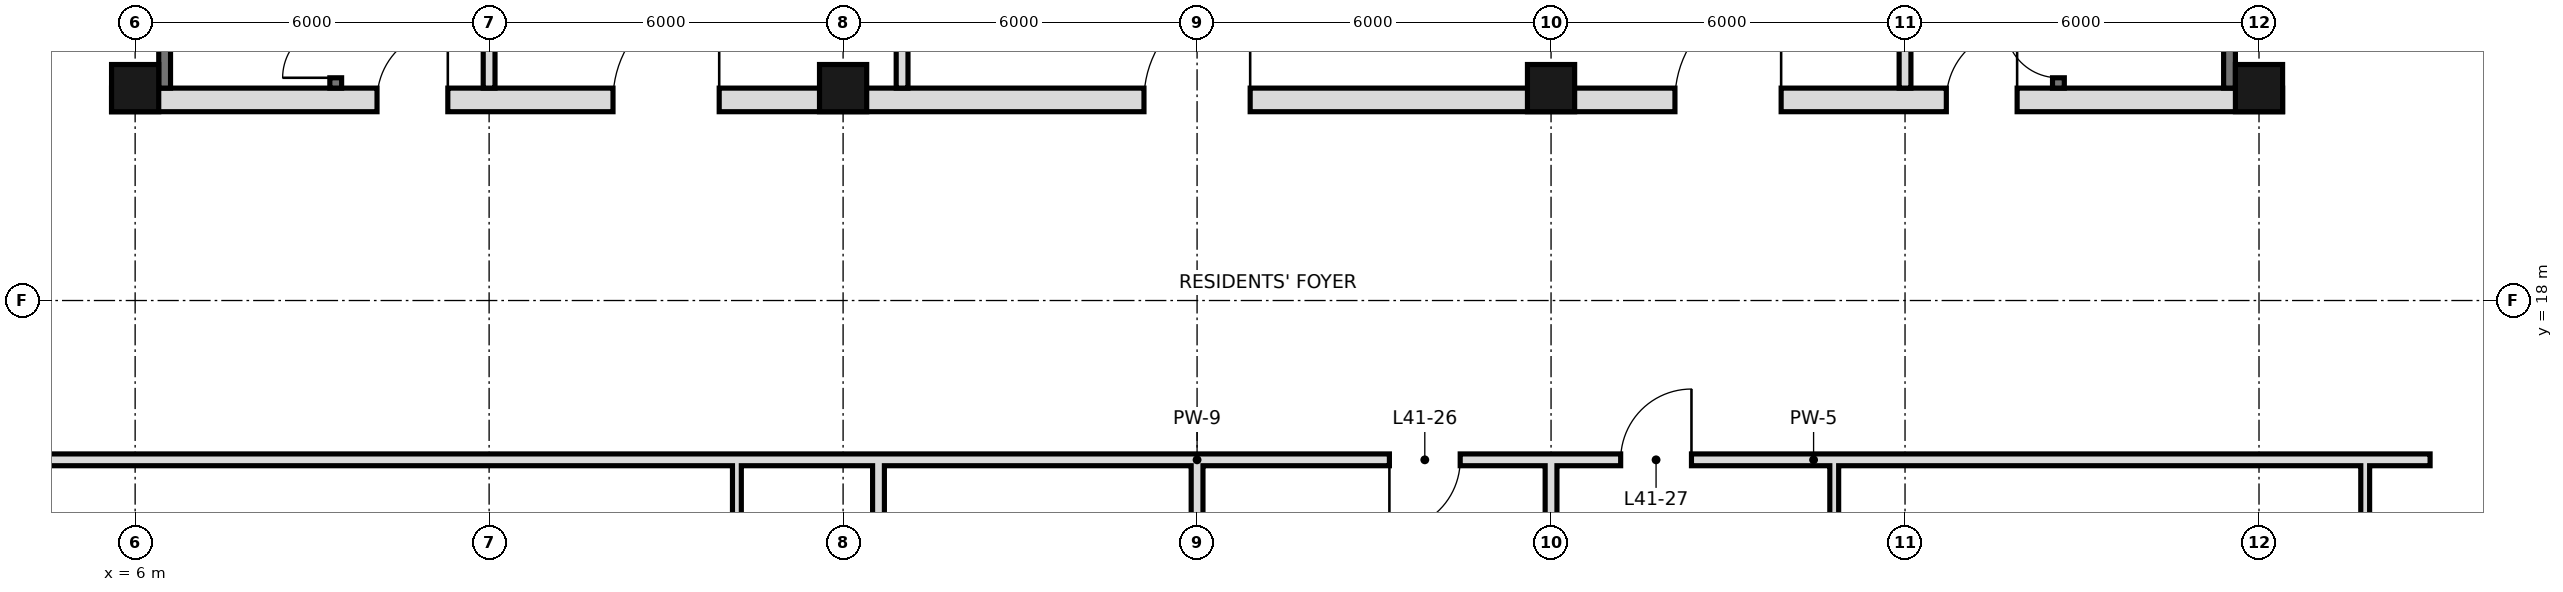
"""IFC4 building model, lengths in metres.
Left out: names, types, materials, properties, quantities, classifications, styles, units other than length and angle.
Written with IfcOpenShell. Run it as: python <this file> out.ifc"""

import sys

from ifc_helpers import new_model, si_unit, direction, frame, frame_2d, origin, origin_2d, place, context, subcontext, project, spatial, rectangle, hollow_rectangle, extrude, element, fill, save


model = new_model("IFC4")
c1 = context("Model", 3, precision=1e-05, world=origin(), true_north=direction((0.0, 1.0)))
c2 = subcontext(c1, "Body", "Model", "MODEL_VIEW")
j1 = project(units=[si_unit("LENGTHUNIT", "METRE"), si_unit("PLANEANGLEUNIT", "RADIAN")], contexts=[c1])
p1 = place(None, origin())
s1 = spatial("IfcSite", under=j1, at=p1, CompositionType="ELEMENT")
p2 = place(p1, origin())
s2 = spatial("IfcBuilding", under=s1, at=p2, CompositionType="ELEMENT")
p3 = place(p2, frame((0.0, 0.0, 178.0)))
s3 = spatial("IfcBuildingStorey", under=s2, at=p3, CompositionType="ELEMENT", Elevation=178.0)
for number, where, z_axis, x_axis in (
    (1, (6.0, 21.6, 0.0), (0.0, 0.0, 1.0), (1.0, 0.0, 0.0)),
    (2, (18.0, 21.6, 0.0), (0.0, 0.0, 1.0), (1.0, 0.0, 0.0)),
    (3, (30.0, 21.6, 0.0), (0.0, 0.0, 1.0), (1.0, 0.0, 0.0)),
    (4, (42.0, 21.6, 0.0), (0.0, 0.0, 1.0), (1.0, 0.0, 0.0)),
):
    element("IfcColumn", number, at=place(p3, frame(where, z_axis=z_axis, x_axis=x_axis)), inside=s3, PredefinedType="COLUMN", context=c2, shape_type="SweptSolid", body=[
        extrude(hollow_rectangle(XDim=0.8, YDim=0.8, WallThickness=0.045, at=origin_2d()), origin(), (0.0, 0.0, 1.0), 3.6),
    ])
p4 = place(p3, frame((16.2, 10.8, 0.0), z_axis=(0.0, 0.0, 1.0), x_axis=(0.0, 1.0, 0.0)))
e5 = element("IfcWall", 5, at=p4, inside=s3, PredefinedType="PARTITIONING", context=c2, shape_type="SweptSolid", body=[
    extrude(rectangle(XDim=4.5, YDim=0.15, at=frame_2d((2.25, 0.0))), origin(), (0.0, 0.0, 1.0), 3.42),
])
for number, where, z_axis, x_axis in (
    (6, (18.6, 10.8, 0.0), (0.0, 0.0, 1.0), (0.0, 1.0, 0.0)),
    (7, (24.0, 10.8, 0.0), (0.0, 0.0, 1.0), (0.0, 1.0, 0.0)),
):
    element("IfcWall", number, at=place(p3, frame(where, z_axis=z_axis, x_axis=x_axis)), inside=s3, PredefinedType="SOLIDWALL", context=c2, shape_type="SweptSolid", body=[
        extrude(rectangle(XDim=4.5, YDim=0.2, at=frame_2d((2.25, 0.0))), origin(), (0.0, 0.0, 1.0), 2.72),
    ])
p5 = place(p3, frame((30.0, -0.6, 0.0), z_axis=(0.0, 0.0, 1.0), x_axis=(0.0, 1.0, 0.0)))
e8 = element("IfcWall", 8, at=p5, inside=s3, PredefinedType="SOLIDWALL", context=c2, shape_type="SweptSolid", body=[
    extrude(rectangle(XDim=15.9, YDim=0.2, at=frame_2d((7.95, 0.0))), origin(), (0.0, 0.0, 1.0), 2.72),
])
for number, where, z_axis, x_axis in (
    (9, (34.8, 10.8, 0.0), (0.0, 0.0, 1.0), (0.0, 1.0, 0.0)),
    (10, (43.8, 10.8, 0.0), (0.0, 0.0, 1.0), (0.0, 1.0, 0.0)),
):
    element("IfcWall", number, at=place(p3, frame(where, z_axis=z_axis, x_axis=x_axis)), inside=s3, PredefinedType="PARTITIONING", context=c2, shape_type="SweptSolid", body=[
        extrude(rectangle(XDim=4.5, YDim=0.15, at=frame_2d((2.25, 0.0))), origin(), (0.0, 0.0, 1.0), 3.42),
    ])
p6 = place(p3, frame((3.1, 15.3, 0.0), z_axis=(0.0, 0.0, 1.0), x_axis=(1.0, 0.0, 0.0)))
e11 = element("IfcWall", 11, at=p6, inside=s3, PredefinedType="SOLIDWALL", context=c2, shape_type="SweptSolid", body=[
    extrude(rectangle(XDim=15.5, YDim=0.2, at=frame_2d((7.75, 0.0))), origin(), (0.0, 0.0, 1.0), 2.72),
])
p7 = place(p3, frame((24.0, 15.3, 0.0), z_axis=(0.0, 0.0, 1.0), x_axis=(1.0, 0.0, 0.0)))
e12 = element("IfcWall", 12, at=p7, inside=s3, PredefinedType="SOLIDWALL", context=c2, shape_type="SweptSolid", body=[
    extrude(rectangle(XDim=20.9, YDim=0.2, at=frame_2d((10.45, 0.0))), origin(), (0.0, 0.0, 1.0), 2.72),
])
p8 = place(p7, frame((3.26, 0.0, 0.0)))
e13 = element("IfcOpeningElement", 13, at=p8, cuts=e12, PredefinedType="OPENING", context=c2, shape_type="SweptSolid", body=[
    extrude(rectangle(XDim=1.2, YDim=2.4, at=frame_2d((0.6, 1.2))), frame((0.0, 0.11, 0.0), z_axis=(0.0, -1.0, 0.0), x_axis=(1.0, 0.0, 0.0)), (0.0, 0.0, 1.0), 0.22),
])
p9 = place(p7, frame((7.18, 0.0, 0.0)))
e14 = element("IfcOpeningElement", 14, at=p9, cuts=e12, PredefinedType="OPENING", context=c2, shape_type="SweptSolid", body=[
    extrude(rectangle(XDim=1.2, YDim=2.4, at=frame_2d((0.6, 1.2))), frame((0.0, 0.11, 0.0), z_axis=(0.0, -1.0, 0.0), x_axis=(1.0, 0.0, 0.0)), (0.0, 0.0, 1.0), 0.22),
])
p10 = place(p3, frame((18.6, 15.3, 0.0), z_axis=(0.0, 0.0, 1.0), x_axis=(1.0, 0.0, 0.0)))
e15 = element("IfcWall", 15, at=p10, inside=s3, PredefinedType="SOLIDWALL", context=c2, shape_type="SweptSolid", body=[
    extrude(rectangle(XDim=5.4, YDim=0.2, at=frame_2d((2.7, 0.0))), origin(), (0.0, 0.0, 1.0), 3.42),
])
for number, where, z_axis, x_axis in (
    (16, (6.5, 21.6, 0.0), (0.0, 0.0, 1.0), (0.0, 1.0, 0.0)),
    (17, (41.5, 21.6, 0.0), (0.0, 0.0, 1.0), (0.0, 1.0, 0.0)),
):
    element("IfcWall", number, at=place(p3, frame(where, z_axis=z_axis, x_axis=x_axis)), inside=s3, PredefinedType="SOLIDWALL", context=c2, shape_type="SweptSolid", body=[
        extrude(rectangle(XDim=23.5, YDim=0.2, at=frame_2d((11.75, 0.0))), origin(), (0.0, 0.0, 1.0), 3.42),
    ])
p11 = place(p3, frame((5.6, 21.4, 0.0), z_axis=(0.0, 0.0, 1.0), x_axis=(1.0, 0.0, 0.0)))
e18 = element("IfcWall", 18, at=p11, inside=s3, PredefinedType="SOLIDWALL", context=c2, shape_type="SweptSolid", body=[
    extrude(rectangle(XDim=36.8, YDim=0.4, at=frame_2d((18.4, 0.0))), origin(), (0.0, 0.0, 1.0), 3.42),
])
p12 = place(p11, frame((8.5, 0.0, 0.0)))
e19 = element("IfcOpeningElement", 19, at=p12, cuts=e18, PredefinedType="OPENING", context=c2, shape_type="SweptSolid", body=[
    extrude(rectangle(XDim=1.8, YDim=2.1, at=frame_2d((0.9, 1.05))), frame((0.0, 0.21, 0.0), z_axis=(0.0, -1.0, 0.0), x_axis=(1.0, 0.0, 0.0)), (0.0, 0.0, 1.0), 0.42),
])
p13 = place(p11, frame((17.5, 0.0, 0.0)))
e20 = element("IfcOpeningElement", 20, at=p13, cuts=e18, PredefinedType="OPENING", context=c2, shape_type="SweptSolid", body=[
    extrude(rectangle(XDim=1.8, YDim=2.1, at=frame_2d((0.9, 1.05))), frame((0.0, 0.21, 0.0), z_axis=(0.0, -1.0, 0.0), x_axis=(1.0, 0.0, 0.0)), (0.0, 0.0, 1.0), 0.42),
])
p14 = place(p11, frame((26.5, 0.0, 0.0)))
e21 = element("IfcOpeningElement", 21, at=p14, cuts=e18, PredefinedType="OPENING", context=c2, shape_type="SweptSolid", body=[
    extrude(rectangle(XDim=1.8, YDim=2.1, at=frame_2d((0.9, 1.05))), frame((0.0, 0.21, 0.0), z_axis=(0.0, -1.0, 0.0), x_axis=(1.0, 0.0, 0.0)), (0.0, 0.0, 1.0), 0.42),
])
p15 = place(p11, frame((4.5, 0.0, 0.0)))
e22 = element("IfcOpeningElement", 22, at=p15, cuts=e18, PredefinedType="OPENING", context=c2, shape_type="SweptSolid", body=[
    extrude(rectangle(XDim=1.2, YDim=2.1, at=frame_2d((0.6, 1.05))), frame((0.0, 0.21, 0.0), z_axis=(0.0, -1.0, 0.0), x_axis=(1.0, 0.0, 0.0)), (0.0, 0.0, 1.0), 0.42),
])
p16 = place(p11, frame((31.1, 0.0, 0.0)))
e23 = element("IfcOpeningElement", 23, at=p16, cuts=e18, PredefinedType="OPENING", context=c2, shape_type="SweptSolid", body=[
    extrude(rectangle(XDim=1.2, YDim=2.1, at=frame_2d((0.6, 1.05))), frame((0.0, 0.21, 0.0), z_axis=(0.0, -1.0, 0.0), x_axis=(1.0, 0.0, 0.0)), (0.0, 0.0, 1.0), 0.42),
])
p17 = place(p3, frame((19.0, 21.6, 0.0), z_axis=(0.0, 0.0, 1.0), x_axis=(0.0, 1.0, 0.0)))
e24 = element("IfcWall", 24, at=p17, inside=s3, PredefinedType="PARTITIONING", context=c2, shape_type="SweptSolid", body=[
    extrude(rectangle(XDim=6.0, YDim=0.2, at=frame_2d((3.0, 0.0))), origin(), (0.0, 0.0, 1.0), 3.42),
])
p18 = place(p17, frame((2.1, 0.0, 0.0)))
e25 = element("IfcOpeningElement", 25, at=p18, cuts=e24, PredefinedType="OPENING", context=c2, shape_type="SweptSolid", body=[
    extrude(rectangle(XDim=1.8, YDim=2.1, at=frame_2d((0.9, 1.05))), frame((0.0, 0.11, 0.0), z_axis=(0.0, -1.0, 0.0), x_axis=(1.0, 0.0, 0.0)), (0.0, 0.0, 1.0), 0.22),
])
for number, where, z_axis, x_axis in (
    (26, (12.0, 21.6, 0.0), (0.0, 0.0, 1.0), (0.0, 1.0, 0.0)),
    (27, (36.0, 21.6, 0.0), (0.0, 0.0, 1.0), (0.0, 1.0, 0.0)),
):
    element("IfcWall", number, at=place(p3, frame(where, z_axis=z_axis, x_axis=x_axis)), inside=s3, PredefinedType="PARTITIONING", context=c2, shape_type="SweptSolid", body=[
        extrude(rectangle(XDim=6.1, YDim=0.2, at=frame_2d((3.05, 0.0))), origin(), (0.0, 0.0, 1.0), 3.42),
    ])
p19 = place(p3, frame((38.6, 21.6, 0.0), z_axis=(0.0, 0.0, 1.0), x_axis=(0.0, 1.0, 0.0)))
e28 = element("IfcWall", 28, at=p19, inside=s3, PredefinedType="SOLIDWALL", context=c2, shape_type="SweptSolid", body=[
    extrude(rectangle(XDim=23.4, YDim=0.2, at=frame_2d((11.7, 0.0))), origin(), (0.0, 0.0, 1.0), 3.42),
])
p20 = place(p19, frame((7.0, 0.0, 0.0)))
e29 = element("IfcOpeningElement", 29, at=p20, cuts=e28, PredefinedType="OPENING", context=c2, shape_type="SweptSolid", body=[
    extrude(rectangle(XDim=1.1, YDim=2.1, at=frame_2d((0.55, 1.05))), frame((0.0, 0.11, 0.0), z_axis=(0.0, -1.0, 0.0), x_axis=(1.0, 0.0, 0.0)), (0.0, 0.0, 1.0), 0.22),
])
p21 = place(p19, frame((10.1, 0.0, 0.0)))
e30 = element("IfcOpeningElement", 30, at=p21, cuts=e28, PredefinedType="OPENING", context=c2, shape_type="SweptSolid", body=[
    extrude(rectangle(XDim=1.1, YDim=2.1, at=frame_2d((0.55, 1.05))), frame((0.0, 0.11, 0.0), z_axis=(0.0, -1.0, 0.0), x_axis=(1.0, 0.0, 0.0)), (0.0, 0.0, 1.0), 0.22),
])
p22 = place(p19, frame((13.2, 0.0, 0.0)))
e31 = element("IfcOpeningElement", 31, at=p22, cuts=e28, PredefinedType="OPENING", context=c2, shape_type="SweptSolid", body=[
    extrude(rectangle(XDim=1.1, YDim=2.1, at=frame_2d((0.55, 1.05))), frame((0.0, 0.11, 0.0), z_axis=(0.0, -1.0, 0.0), x_axis=(1.0, 0.0, 0.0)), (0.0, 0.0, 1.0), 0.22),
])
p23 = place(p19, frame((15.7, 0.0, 0.0)))
e32 = element("IfcOpeningElement", 32, at=p23, cuts=e28, PredefinedType="OPENING", context=c2, shape_type="SweptSolid", body=[
    extrude(rectangle(XDim=1.0, YDim=2.1, at=frame_2d((0.5, 1.05))), frame((0.0, 0.11, 0.0), z_axis=(0.0, -1.0, 0.0), x_axis=(1.0, 0.0, 0.0)), (0.0, 0.0, 1.0), 0.22),
])
p24 = place(p19, frame((0.175, 0.0, 0.0)))
e33 = element("IfcOpeningElement", 33, at=p24, cuts=e28, PredefinedType="OPENING", context=c2, shape_type="SweptSolid", body=[
    extrude(rectangle(XDim=0.9, YDim=2.1, at=frame_2d((0.45, 1.05))), frame((0.0, 0.11, 0.0), z_axis=(0.0, -1.0, 0.0), x_axis=(1.0, 0.0, 0.0)), (0.0, 0.0, 1.0), 0.22),
])
p25 = place(p3, frame((9.4, 21.6, 0.0), z_axis=(0.0, 0.0, 1.0), x_axis=(0.0, 1.0, 0.0)))
e34 = element("IfcWall", 34, at=p25, inside=s3, PredefinedType="SOLIDWALL", context=c2, shape_type="SweptSolid", body=[
    extrude(rectangle(XDim=23.4, YDim=0.2, at=frame_2d((11.7, 0.0))), origin(), (0.0, 0.0, 1.0), 3.42),
])
p26 = place(p25, frame((7.95, 0.0, 0.0)))
e35 = element("IfcOpeningElement", 35, at=p26, cuts=e34, PredefinedType="OPENING", context=c2, shape_type="SweptSolid", body=[
    extrude(rectangle(XDim=1.0, YDim=2.1, at=frame_2d((0.5, 1.05))), frame((0.0, 0.11, 0.0), z_axis=(0.0, -1.0, 0.0), x_axis=(1.0, 0.0, 0.0)), (0.0, 0.0, 1.0), 0.22),
])
p27 = place(p25, frame((12.6, 0.0, 0.0)))
e36 = element("IfcOpeningElement", 36, at=p27, cuts=e34, PredefinedType="OPENING", context=c2, shape_type="SweptSolid", body=[
    extrude(rectangle(XDim=1.0, YDim=2.1, at=frame_2d((0.5, 1.05))), frame((0.0, 0.11, 0.0), z_axis=(0.0, -1.0, 0.0), x_axis=(1.0, 0.0, 0.0)), (0.0, 0.0, 1.0), 0.22),
])
p28 = place(p25, frame((15.7, 0.0, 0.0)))
e37 = element("IfcOpeningElement", 37, at=p28, cuts=e34, PredefinedType="OPENING", context=c2, shape_type="SweptSolid", body=[
    extrude(rectangle(XDim=1.0, YDim=2.1, at=frame_2d((0.5, 1.05))), frame((0.0, 0.11, 0.0), z_axis=(0.0, -1.0, 0.0), x_axis=(1.0, 0.0, 0.0)), (0.0, 0.0, 1.0), 0.22),
])
p29 = place(p25, frame((0.175, 0.0, 0.0)))
e38 = element("IfcOpeningElement", 38, at=p29, cuts=e34, PredefinedType="OPENING", context=c2, shape_type="SweptSolid", body=[
    extrude(rectangle(XDim=0.9, YDim=2.1, at=frame_2d((0.45, 1.05))), frame((0.0, 0.11, 0.0), z_axis=(0.0, -1.0, 0.0), x_axis=(1.0, 0.0, 0.0)), (0.0, 0.0, 1.0), 0.22),
])
p30 = place(p8, frame((1.2, 0.0, 0.0), z_axis=(0.0, 0.0, 1.0), x_axis=(-1.0, 0.0, 0.0)))
e39 = element("IfcDoor", 39, at=p30, inside=s3, OperationType="SINGLE_SWING_RIGHT", PredefinedType="DOOR", context=c2, shape_type="SweptSolid", body=[
    extrude(rectangle(XDim=1.2, YDim=2.4, at=frame_2d((0.6, 1.2))), frame((0.0, 0.025, 0.0), z_axis=(0.0, -1.0, 0.0), x_axis=(1.0, 0.0, 0.0)), (0.0, 0.0, 1.0), 0.05),
])
fill(e13, e39)
p31 = place(p9, frame((1.2, 0.0, 0.0), z_axis=(0.0, 0.0, 1.0), x_axis=(-1.0, 0.0, 0.0)))
e40 = element("IfcDoor", 40, at=p31, inside=s3, OperationType="SINGLE_SWING_LEFT", PredefinedType="DOOR", context=c2, shape_type="SweptSolid", body=[
    extrude(rectangle(XDim=1.2, YDim=2.4, at=frame_2d((0.6, 1.2))), frame((0.0, 0.025, 0.0), z_axis=(0.0, -1.0, 0.0), x_axis=(1.0, 0.0, 0.0)), (0.0, 0.0, 1.0), 0.05),
])
fill(e14, e40)
p32 = place(p12, frame((1.8, 0.0, 0.0), z_axis=(0.0, 0.0, 1.0), x_axis=(-1.0, 0.0, 0.0)))
e41 = element("IfcDoor", 41, at=p32, inside=s3, OperationType="SINGLE_SWING_LEFT", PredefinedType="DOOR", context=c2, shape_type="SweptSolid", body=[
    extrude(rectangle(XDim=1.8, YDim=2.1, at=frame_2d((0.9, 1.05))), frame((0.0, 0.025, 0.0), z_axis=(0.0, -1.0, 0.0), x_axis=(1.0, 0.0, 0.0)), (0.0, 0.0, 1.0), 0.05),
])
fill(e19, e41)
p33 = place(p13, frame((1.8, 0.0, 0.0), z_axis=(0.0, 0.0, 1.0), x_axis=(-1.0, 0.0, 0.0)))
e42 = element("IfcDoor", 42, at=p33, inside=s3, OperationType="SINGLE_SWING_LEFT", PredefinedType="DOOR", context=c2, shape_type="SweptSolid", body=[
    extrude(rectangle(XDim=1.8, YDim=2.1, at=frame_2d((0.9, 1.05))), frame((0.0, 0.025, 0.0), z_axis=(0.0, -1.0, 0.0), x_axis=(1.0, 0.0, 0.0)), (0.0, 0.0, 1.0), 0.05),
])
fill(e20, e42)
p34 = place(p14, frame((1.8, 0.0, 0.0), z_axis=(0.0, 0.0, 1.0), x_axis=(-1.0, 0.0, 0.0)))
e43 = element("IfcDoor", 43, at=p34, inside=s3, OperationType="SINGLE_SWING_LEFT", PredefinedType="DOOR", context=c2, shape_type="SweptSolid", body=[
    extrude(rectangle(XDim=1.8, YDim=2.1, at=frame_2d((0.9, 1.05))), frame((0.0, 0.025, 0.0), z_axis=(0.0, -1.0, 0.0), x_axis=(1.0, 0.0, 0.0)), (0.0, 0.0, 1.0), 0.05),
])
fill(e21, e43)
p35 = place(p15, frame((1.2, 0.0, 0.0), z_axis=(0.0, 0.0, 1.0), x_axis=(-1.0, 0.0, 0.0)))
e44 = element("IfcDoor", 44, at=p35, inside=s3, OperationType="SINGLE_SWING_LEFT", PredefinedType="DOOR", context=c2, shape_type="SweptSolid", body=[
    extrude(rectangle(XDim=1.2, YDim=2.1, at=frame_2d((0.6, 1.05))), frame((0.0, 0.025, 0.0), z_axis=(0.0, -1.0, 0.0), x_axis=(1.0, 0.0, 0.0)), (0.0, 0.0, 1.0), 0.05),
])
fill(e22, e44)
p36 = place(p16, frame((1.2, 0.0, 0.0), z_axis=(0.0, 0.0, 1.0), x_axis=(-1.0, 0.0, 0.0)))
e45 = element("IfcDoor", 45, at=p36, inside=s3, OperationType="SINGLE_SWING_LEFT", PredefinedType="DOOR", context=c2, shape_type="SweptSolid", body=[
    extrude(rectangle(XDim=1.2, YDim=2.1, at=frame_2d((0.6, 1.05))), frame((0.0, 0.025, 0.0), z_axis=(0.0, -1.0, 0.0), x_axis=(1.0, 0.0, 0.0)), (0.0, 0.0, 1.0), 0.05),
])
fill(e23, e45)
p37 = place(p29, origin())
e46 = element("IfcDoor", 46, at=p37, inside=s3, OperationType="SINGLE_SWING_LEFT", PredefinedType="DOOR", context=c2, shape_type="SweptSolid", body=[
    extrude(rectangle(XDim=0.9, YDim=2.1, at=frame_2d((0.45, 1.05))), frame((0.0, 0.025, 0.0), z_axis=(0.0, -1.0, 0.0), x_axis=(1.0, 0.0, 0.0)), (0.0, 0.0, 1.0), 0.05),
])
fill(e38, e46)
p38 = place(p24, frame((0.9, 0.0, 0.0), z_axis=(0.0, 0.0, 1.0), x_axis=(-1.0, 0.0, 0.0)))
e47 = element("IfcDoor", 47, at=p38, inside=s3, OperationType="SINGLE_SWING_LEFT", PredefinedType="DOOR", context=c2, shape_type="SweptSolid", body=[
    extrude(rectangle(XDim=0.9, YDim=2.1, at=frame_2d((0.45, 1.05))), frame((0.0, 0.025, 0.0), z_axis=(0.0, -1.0, 0.0), x_axis=(1.0, 0.0, 0.0)), (0.0, 0.0, 1.0), 0.05),
])
fill(e33, e47)
save(model, sys.argv[1])
